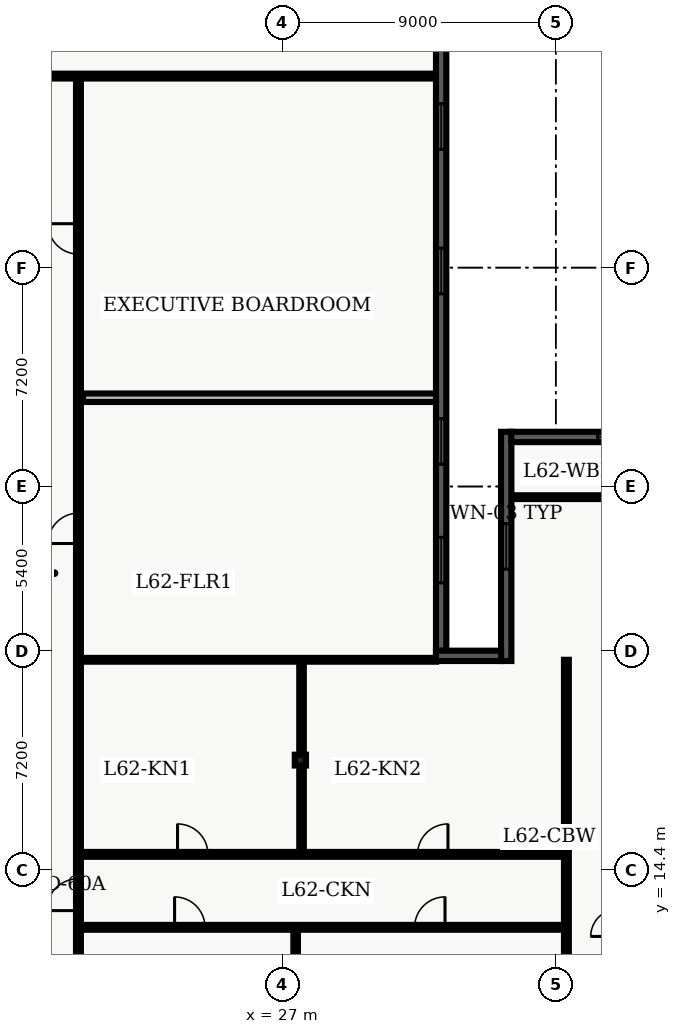
"""IFC4 building model, lengths in metres.
Left out: names, types, materials, properties, quantities, classifications, styles, units other than length and angle.
Written with IfcOpenShell. Run it as: python <this file> out.ifc"""

import sys

from ifc_helpers import new_model, entity, si_unit, converted_unit, direction, frame, origin_with_axes, origin_2d_with_axis, place, context, subcontext, project, spatial, polyline, rectangle, i_section, outline, extrude, element, fill, save


model = new_model("IFC4")
c1 = context("Model", 3, precision=1e-05, world=origin_with_axes(), true_north=direction((0.0, 1.0)))
c2 = subcontext(c1, "Body", "Model", "MODEL_VIEW")
j1 = project(units=[si_unit("LENGTHUNIT", "METRE"), converted_unit("PLANEANGLEUNIT", "DEGREE", entity("IfcPlaneAngleMeasure", 0.017), si_unit("PLANEANGLEUNIT", "RADIAN"), dimensions=[0, 0, 0, 0, 0, 0, 0])], contexts=[c1])
p1 = place(None, origin_with_axes())
s1 = spatial("IfcSite", under=j1, at=p1, CompositionType="ELEMENT")
p2 = place(p1, origin_with_axes())
s2 = spatial("IfcBuilding", under=s1, at=p2, CompositionType="ELEMENT")
p3 = place(p2, frame((0.0, 0.0, 252.9), z_axis=(0.0, 0.0, 1.0), x_axis=(1.0, 0.0, 0.0)))
s3 = spatial("IfcBuildingStorey", under=s2, at=p3, CompositionType="ELEMENT", Elevation=252.9)
p4 = place(p3, frame((27.6, 18.0, 0.0), z_axis=(0.0, 0.0, 1.0), x_axis=(1.0, 0.0, 0.0)))
e1 = element("IfcColumn", 1, at=p4, inside=s3, PredefinedType="COLUMN", context=c2, shape_type="SweptSolid", body=[
    extrude(i_section(OverallWidth=0.369, OverallDepth=0.356, WebThickness=0.011, FlangeThickness=0.018, FilletRadius=0.018, at=origin_2d_with_axis()), origin_with_axes(), (0.0, 0.0, 1.0), 3.9),
])
p5 = place(p3, frame((8.135, 40.5, 0.0), z_axis=(0.0, 0.0, 1.0), x_axis=(1.0, 0.0, 0.0)))
e2 = element("IfcWall", 2, at=p5, inside=s3, PredefinedType="PARTITIONING", context=c2, shape_type="SweptSolid", body=[
    extrude(outline(polyline([(0.0, -0.08), (23.93, -0.08), (23.93, 0.08), (0.0, 0.08), (0.0, -0.08)])), origin_with_axes(), (0.0, 0.0, 1.0), 2.7),
])
p6 = place(p5, frame((0.76, 0.0, 0.0), z_axis=(0.0, 0.0, 1.0), x_axis=(1.0, 0.0, 0.0)))
e3 = element("IfcOpeningElement", 3, at=p6, cuts=e2, PredefinedType="OPENING", context=c2, shape_type="SweptSolid", body=[
    extrude(rectangle(XDim=1.0, YDim=0.18, at=origin_2d_with_axis()), origin_with_axes(), (0.0, 0.0, 1.0), 2.15),
])
p7 = place(p5, frame((7.625, 0.0, 0.0), z_axis=(0.0, 0.0, 1.0), x_axis=(1.0, 0.0, 0.0)))
e4 = element("IfcOpeningElement", 4, at=p7, cuts=e2, PredefinedType="OPENING", context=c2, shape_type="SweptSolid", body=[
    extrude(rectangle(XDim=1.0, YDim=0.18, at=origin_2d_with_axis()), origin_with_axes(), (0.0, 0.0, 1.0), 2.15),
])
p8 = place(p3, frame((20.3, 7.8, 0.0), z_axis=(0.0, 0.0, 1.0), x_axis=(0.0, 1.0, 0.0)))
e5 = element("IfcWall", 5, at=p8, inside=s3, PredefinedType="PARTITIONING", context=c2, shape_type="SweptSolid", body=[
    extrude(outline(polyline([(0.0, -0.08), (32.7, -0.08), (32.7, 0.08), (0.0, 0.08), (0.0, -0.08)])), origin_with_axes(), (0.0, 0.0, 1.0), 2.7),
])
p9 = place(p8, frame((17.825, 0.0, 0.0), z_axis=(0.0, 0.0, 1.0), x_axis=(1.0, 0.0, 0.0)))
e6 = element("IfcOpeningElement", 6, at=p9, cuts=e5, PredefinedType="OPENING", context=c2, shape_type="SweptSolid", body=[
    extrude(rectangle(XDim=1.0, YDim=0.18, at=origin_2d_with_axis()), origin_with_axes(), (0.0, 0.0, 1.0), 2.15),
])
p10 = place(p8, frame((27.345, 0.0, 0.0), z_axis=(0.0, 0.0, 1.0), x_axis=(1.0, 0.0, 0.0)))
e7 = element("IfcOpeningElement", 7, at=p10, cuts=e5, PredefinedType="OPENING", context=c2, shape_type="SweptSolid", body=[
    extrude(rectangle(XDim=1.0, YDim=0.18, at=origin_2d_with_axis()), origin_with_axes(), (0.0, 0.0, 1.0), 2.15),
])
p11 = place(p8, frame((5.775, 0.0, 0.0), z_axis=(0.0, 0.0, 1.0), x_axis=(1.0, 0.0, 0.0)))
e8 = element("IfcOpeningElement", 8, at=p11, cuts=e5, PredefinedType="OPENING", context=c2, shape_type="SweptSolid", body=[
    extrude(rectangle(XDim=1.05, YDim=0.18, at=origin_2d_with_axis()), origin_with_axes(), (0.0, 0.0, 1.0), 2.15),
])
p12 = place(p3, frame((20.45, 29.92, 0.0), z_axis=(0.0, 0.0, 1.0), x_axis=(1.0, 0.0, 0.0)))
e9 = element("IfcWall", 9, at=p12, inside=s3, PredefinedType="PARTITIONING", context=c2, shape_type="SweptSolid", body=[
    extrude(outline(polyline([(0.0, -0.14), (11.615, -0.14), (11.615, 0.14), (0.0, 0.14), (0.0, -0.14)])), origin_with_axes(), (0.0, 0.0, 1.0), 2.7),
])
p13 = place(p3, frame((20.3, 12.5, 0.0), z_axis=(0.0, 0.0, 1.0), x_axis=(1.0, 0.0, 0.0)))
e10 = element("IfcWall", 10, at=p13, inside=s3, PredefinedType="PARTITIONING", context=c2, shape_type="SweptSolid", body=[
    extrude(outline(polyline([(0.0, -0.08), (16.05, -0.08), (16.05, 0.08), (0.0, 0.08), (0.0, -0.08)])), origin_with_axes(), (0.0, 0.0, 1.0), 2.7),
])
p14 = place(p13, frame((3.662, 0.0, 0.0), z_axis=(0.0, 0.0, 1.0), x_axis=(1.0, 0.0, 0.0)))
e11 = element("IfcOpeningElement", 11, at=p14, cuts=e10, PredefinedType="OPENING", context=c2, shape_type="SweptSolid", body=[
    extrude(rectangle(XDim=1.0, YDim=0.18, at=origin_2d_with_axis()), origin_with_axes(), (0.0, 0.0, 1.0), 2.15),
])
p15 = place(p13, frame((11.557, 0.0, 0.0), z_axis=(0.0, 0.0, 1.0), x_axis=(1.0, 0.0, 0.0)))
e12 = element("IfcOpeningElement", 12, at=p15, cuts=e10, PredefinedType="OPENING", context=c2, shape_type="SweptSolid", body=[
    extrude(rectangle(XDim=1.0, YDim=0.18, at=origin_2d_with_axis()), origin_with_axes(), (0.0, 0.0, 1.0), 2.15),
])
p16 = place(p3, frame((20.3, 14.9, 0.0), z_axis=(0.0, 0.0, 1.0), x_axis=(1.0, 0.0, 0.0)))
e13 = element("IfcWall", 13, at=p16, inside=s3, PredefinedType="PARTITIONING", context=c2, shape_type="SweptSolid", body=[
    extrude(outline(polyline([(0.0, -0.08), (16.05, -0.08), (16.05, 0.08), (0.0, 0.08), (0.0, -0.08)])), origin_with_axes(), (0.0, 0.0, 1.0), 2.7),
])
p17 = place(p16, frame((3.759, 0.0, 0.0), z_axis=(0.0, 0.0, 1.0), x_axis=(1.0, 0.0, 0.0)))
e14 = element("IfcOpeningElement", 14, at=p17, cuts=e13, PredefinedType="OPENING", context=c2, shape_type="SweptSolid", body=[
    extrude(rectangle(XDim=1.0, YDim=0.18, at=origin_2d_with_axis()), origin_with_axes(), (0.0, 0.0, 1.0), 2.15),
])
p18 = place(p16, frame((11.654, 0.0, 0.0), z_axis=(0.0, 0.0, 1.0), x_axis=(1.0, 0.0, 0.0)))
e15 = element("IfcOpeningElement", 15, at=p18, cuts=e13, PredefinedType="OPENING", context=c2, shape_type="SweptSolid", body=[
    extrude(rectangle(XDim=1.0, YDim=0.18, at=origin_2d_with_axis()), origin_with_axes(), (0.0, 0.0, 1.0), 2.15),
])
p19 = place(p3, frame((36.35, 4.35, 0.0), z_axis=(0.0, 0.0, 1.0), x_axis=(0.0, 1.0, 0.0)))
e16 = element("IfcWall", 16, at=p19, inside=s3, PredefinedType="PARTITIONING", context=c2, shape_type="SweptSolid", body=[
    extrude(outline(polyline([(0.0, -0.08), (16.95, -0.08), (16.95, 0.08), (0.0, 0.08), (0.0, -0.08)])), origin_with_axes(), (0.0, 0.0, 1.0), 2.7),
])
p20 = place(p3, frame((27.444, 0.335, 0.0), z_axis=(0.0, 0.0, 1.0), x_axis=(0.0, 1.0, 0.0)))
e17 = element("IfcWall", 17, at=p20, inside=s3, PredefinedType="PARTITIONING", context=c2, shape_type="SweptSolid", body=[
    extrude(outline(polyline([(0.0, -0.075), (12.045, -0.075), (12.045, 0.075), (0.0, 0.075), (0.0, -0.075)])), origin_with_axes(), (0.0, 0.0, 1.0), 2.7),
])
p21 = place(p3, frame((27.638, 15.02, 0.0), z_axis=(0.0, 0.0, 1.0), x_axis=(0.0, 1.0, 0.0)))
e18 = element("IfcWall", 18, at=p21, inside=s3, PredefinedType="PARTITIONING", context=c2, shape_type="SweptSolid", body=[
    extrude(outline(polyline([(0.0, -0.075), (6.2, -0.075), (6.2, 0.075), (0.0, 0.075), (0.0, -0.075)])), origin_with_axes(), (0.0, 0.0, 1.0), 2.7),
])
p22 = place(p3, frame((34.535, 26.65, 0.0), z_axis=(0.0, 0.0, 1.0), x_axis=(1.0, 0.0, 0.0)))
e19 = element("IfcWall", 19, at=p22, inside=s3, PredefinedType="PARTITIONING", context=c2, shape_type="SweptSolid", body=[
    extrude(outline(polyline([(0.0, -0.062), (12.995, -0.062), (12.995, 0.062), (0.0, 0.062), (0.0, -0.062)])), origin_with_axes(), (0.0, 0.0, 1.0), 2.7),
])
p23 = place(p22, frame((8.465, 0.0, 0.0), z_axis=(0.0, 0.0, 1.0), x_axis=(1.0, 0.0, 0.0)))
e20 = element("IfcOpeningElement", 20, at=p23, cuts=e19, PredefinedType="OPENING", context=c2, shape_type="SweptSolid", body=[
    extrude(rectangle(XDim=1.0, YDim=0.145, at=origin_2d_with_axis()), origin_with_axes(), (0.0, 0.0, 1.0), 2.15),
])
p24 = place(p3, frame((20.3, 21.3, 0.0), z_axis=(0.0, 0.0, 1.0), x_axis=(1.0, 0.0, 0.0)))
e21 = element("IfcWall", 21, at=p24, inside=s3, PredefinedType="PARTITIONING", context=c2, shape_type="SweptSolid", body=[
    extrude(outline(polyline([(0.0, -0.062), (11.765, -0.062), (11.765, 0.062), (0.0, 0.062), (0.0, -0.062)])), origin_with_axes(), (0.0, 0.0, 1.0), 2.7),
])
p25 = place(p3, frame((34.37, 21.26, 0.0), z_axis=(0.0, 0.0, 1.0), x_axis=(0.0, 1.0, 0.0)))
e22 = element("IfcWall", 22, at=p25, inside=s3, PredefinedType="SOLIDWALL", context=c2, shape_type="SweptSolid", body=[
    extrude(outline(polyline([(0.0, -0.17), (7.54, -0.17), (7.54, 0.17), (0.0, 0.17), (0.0, -0.17)])), origin_with_axes(), (0.0, 0.0, 1.0), 3.66),
])
p26 = place(p25, frame((3.77, 0.0, 0.45), z_axis=(0.0, 0.0, 1.0), x_axis=(1.0, 0.0, 0.0)))
e23 = element("IfcOpeningElement", 23, at=p26, cuts=e22, PredefinedType="OPENING", context=c2, shape_type="SweptSolid", body=[
    extrude(rectangle(XDim=1.5, YDim=0.36, at=origin_2d_with_axis()), origin_with_axes(), (0.0, 0.0, 1.0), 2.1),
])
p27 = place(p3, frame((34.54, 28.63, 0.0), z_axis=(0.0, 0.0, 1.0), x_axis=(1.0, 0.0, 0.0)))
e24 = element("IfcWall", 24, at=p27, inside=s3, PredefinedType="SOLIDWALL", context=c2, shape_type="SweptSolid", body=[
    extrude(outline(polyline([(0.0, -0.17), (13.16, -0.17), (13.16, 0.17), (0.0, 0.17), (0.0, -0.17)])), origin_with_axes(), (0.0, 0.0, 1.0), 3.66),
])
p28 = place(p27, frame((3.59, 0.0, 0.45), z_axis=(0.0, 0.0, 1.0), x_axis=(1.0, 0.0, 0.0)))
e25 = element("IfcOpeningElement", 25, at=p28, cuts=e24, PredefinedType="OPENING", context=c2, shape_type="SweptSolid", body=[
    extrude(rectangle(XDim=1.5, YDim=0.36, at=origin_2d_with_axis()), origin_with_axes(), (0.0, 0.0, 1.0), 2.1),
])
p29 = place(p27, frame((9.57, 0.0, 0.45), z_axis=(0.0, 0.0, 1.0), x_axis=(1.0, 0.0, 0.0)))
e26 = element("IfcOpeningElement", 26, at=p29, cuts=e24, PredefinedType="OPENING", context=c2, shape_type="SweptSolid", body=[
    extrude(rectangle(XDim=1.5, YDim=0.36, at=origin_2d_with_axis()), origin_with_axes(), (0.0, 0.0, 1.0), 2.1),
])
p30 = place(p3, frame((32.23, 41.82, 0.0), z_axis=(0.0, 0.0, 1.0), x_axis=(0.0, -1.0, 0.0)))
e27 = element("IfcWall", 27, at=p30, inside=s3, PredefinedType="SOLIDWALL", context=c2, shape_type="SweptSolid", body=[
    extrude(outline(polyline([(0.0, -0.17), (20.22, -0.17), (20.22, 0.17), (0.0, 0.17), (0.0, -0.17)])), origin_with_axes(), (0.0, 0.0, 1.0), 3.66),
])
p31 = place(p30, frame((2.978, 0.0, 0.45), z_axis=(0.0, 0.0, 1.0), x_axis=(1.0, 0.0, 0.0)))
e28 = element("IfcOpeningElement", 28, at=p31, cuts=e27, PredefinedType="OPENING", context=c2, shape_type="SweptSolid", body=[
    extrude(rectangle(XDim=1.5, YDim=0.36, at=origin_2d_with_axis()), origin_with_axes(), (0.0, 0.0, 1.0), 2.1),
])
p32 = place(p30, frame((7.732, 0.0, 0.45), z_axis=(0.0, 0.0, 1.0), x_axis=(1.0, 0.0, 0.0)))
e29 = element("IfcOpeningElement", 29, at=p32, cuts=e27, PredefinedType="OPENING", context=c2, shape_type="SweptSolid", body=[
    extrude(rectangle(XDim=1.5, YDim=0.36, at=origin_2d_with_axis()), origin_with_axes(), (0.0, 0.0, 1.0), 2.1),
])
p33 = place(p30, frame((13.337, 0.0, 0.45), z_axis=(0.0, 0.0, 1.0), x_axis=(1.0, 0.0, 0.0)))
e30 = element("IfcOpeningElement", 30, at=p33, cuts=e27, PredefinedType="OPENING", context=c2, shape_type="SweptSolid", body=[
    extrude(rectangle(XDim=1.5, YDim=0.36, at=origin_2d_with_axis()), origin_with_axes(), (0.0, 0.0, 1.0), 2.1),
])
p34 = place(p30, frame((17.242, 0.0, 0.45), z_axis=(0.0, 0.0, 1.0), x_axis=(1.0, 0.0, 0.0)))
e31 = element("IfcOpeningElement", 31, at=p34, cuts=e27, PredefinedType="OPENING", context=c2, shape_type="SweptSolid", body=[
    extrude(rectangle(XDim=1.5, YDim=0.36, at=origin_2d_with_axis()), origin_with_axes(), (0.0, 0.0, 1.0), 2.1),
])
p35 = place(p3, frame((32.06, 21.43, 0.0), z_axis=(0.0, 0.0, 1.0), x_axis=(1.0, 0.0, 0.0)))
e32 = element("IfcWall", 32, at=p35, inside=s3, PredefinedType="SOLIDWALL", context=c2, shape_type="SweptSolid", body=[
    extrude(outline(polyline([(0.0, -0.17), (2.14, -0.17), (2.14, 0.17), (0.0, 0.17), (0.0, -0.17)])), origin_with_axes(), (0.0, 0.0, 1.0), 3.66),
])
p36 = place(p8, frame((17.825, 0.0, 0.0), z_axis=(0.0, 0.0, 1.0), x_axis=(1.0, 0.0, 0.0)))
e33 = element("IfcDoor", 33, at=p36, inside=s3, OperationType="SINGLE_SWING_LEFT", PredefinedType="DOOR", context=c2, shape_type="SweptSolid", body=[
    extrude(rectangle(XDim=1.0, YDim=0.09, at=origin_2d_with_axis()), origin_with_axes(), (0.0, 0.0, 1.0), 2.15),
])
fill(e6, e33)
p37 = place(p8, frame((27.345, 0.0, 0.0), z_axis=(0.0, 0.0, 1.0), x_axis=(1.0, 0.0, 0.0)))
e34 = element("IfcDoor", 34, at=p37, inside=s3, OperationType="SINGLE_SWING_RIGHT", PredefinedType="DOOR", context=c2, shape_type="SweptSolid", body=[
    extrude(rectangle(XDim=1.0, YDim=0.09, at=origin_2d_with_axis()), origin_with_axes(), (0.0, 0.0, 1.0), 2.15),
])
fill(e7, e34)
p38 = place(p8, frame((5.775, 0.0, 0.0), z_axis=(0.0, 0.0, 1.0), x_axis=(1.0, 0.0, 0.0)))
e35 = element("IfcDoor", 35, at=p38, inside=s3, OperationType="SINGLE_SWING_LEFT", PredefinedType="DOOR", context=c2, shape_type="SweptSolid", body=[
    extrude(rectangle(XDim=1.05, YDim=0.09, at=origin_2d_with_axis()), origin_with_axes(), (0.0, 0.0, 1.0), 2.15),
])
fill(e8, e35)
p39 = place(p13, frame((3.662, 0.0, 0.0), z_axis=(0.0, 0.0, 1.0), x_axis=(1.0, 0.0, 0.0)))
e36 = element("IfcDoor", 36, at=p39, inside=s3, OperationType="SINGLE_SWING_LEFT", PredefinedType="DOOR", context=c2, shape_type="SweptSolid", body=[
    extrude(rectangle(XDim=1.0, YDim=0.09, at=origin_2d_with_axis()), origin_with_axes(), (0.0, 0.0, 1.0), 2.15),
])
fill(e11, e36)
p40 = place(p13, frame((11.557, 0.0, 0.0), z_axis=(0.0, 0.0, 1.0), x_axis=(1.0, 0.0, 0.0)))
e37 = element("IfcDoor", 37, at=p40, inside=s3, OperationType="SINGLE_SWING_RIGHT", PredefinedType="DOOR", context=c2, shape_type="SweptSolid", body=[
    extrude(rectangle(XDim=1.0, YDim=0.09, at=origin_2d_with_axis()), origin_with_axes(), (0.0, 0.0, 1.0), 2.15),
])
fill(e12, e37)
p41 = place(p16, frame((3.759, 0.0, 0.0), z_axis=(0.0, 0.0, 1.0), x_axis=(1.0, 0.0, 0.0)))
e38 = element("IfcDoor", 38, at=p41, inside=s3, OperationType="SINGLE_SWING_LEFT", PredefinedType="DOOR", context=c2, shape_type="SweptSolid", body=[
    extrude(rectangle(XDim=1.0, YDim=0.09, at=origin_2d_with_axis()), origin_with_axes(), (0.0, 0.0, 1.0), 2.15),
])
fill(e14, e38)
p42 = place(p16, frame((11.654, 0.0, 0.0), z_axis=(0.0, 0.0, 1.0), x_axis=(1.0, 0.0, 0.0)))
e39 = element("IfcDoor", 39, at=p42, inside=s3, OperationType="SINGLE_SWING_RIGHT", PredefinedType="DOOR", context=c2, shape_type="SweptSolid", body=[
    extrude(rectangle(XDim=1.0, YDim=0.09, at=origin_2d_with_axis()), origin_with_axes(), (0.0, 0.0, 1.0), 2.15),
])
fill(e15, e39)
p43 = place(p25, frame((3.77, 0.0, 0.45), z_axis=(0.0, 0.0, 1.0), x_axis=(1.0, 0.0, 0.0)))
e40 = element("IfcWindow", 40, at=p43, inside=s3, PredefinedType="WINDOW", context=c2, shape_type="SweptSolid", body=[
    extrude(rectangle(XDim=1.5, YDim=0.09, at=origin_2d_with_axis()), origin_with_axes(), (0.0, 0.0, 1.0), 2.1),
])
fill(e23, e40)
p44 = place(p27, frame((3.59, 0.0, 0.45), z_axis=(0.0, 0.0, 1.0), x_axis=(1.0, 0.0, 0.0)))
e41 = element("IfcWindow", 41, at=p44, inside=s3, PredefinedType="WINDOW", context=c2, shape_type="SweptSolid", body=[
    extrude(rectangle(XDim=1.5, YDim=0.09, at=origin_2d_with_axis()), origin_with_axes(), (0.0, 0.0, 1.0), 2.1),
])
fill(e25, e41)
p45 = place(p30, frame((2.978, 0.0, 0.45), z_axis=(0.0, 0.0, 1.0), x_axis=(1.0, 0.0, 0.0)))
e42 = element("IfcWindow", 42, at=p45, inside=s3, PredefinedType="WINDOW", context=c2, shape_type="SweptSolid", body=[
    extrude(rectangle(XDim=1.5, YDim=0.09, at=origin_2d_with_axis()), origin_with_axes(), (0.0, 0.0, 1.0), 2.1),
])
fill(e28, e42)
p46 = place(p30, frame((7.732, 0.0, 0.45), z_axis=(0.0, 0.0, 1.0), x_axis=(1.0, 0.0, 0.0)))
e43 = element("IfcWindow", 43, at=p46, inside=s3, PredefinedType="WINDOW", context=c2, shape_type="SweptSolid", body=[
    extrude(rectangle(XDim=1.5, YDim=0.09, at=origin_2d_with_axis()), origin_with_axes(), (0.0, 0.0, 1.0), 2.1),
])
fill(e29, e43)
p47 = place(p30, frame((13.337, 0.0, 0.45), z_axis=(0.0, 0.0, 1.0), x_axis=(1.0, 0.0, 0.0)))
e44 = element("IfcWindow", 44, at=p47, inside=s3, PredefinedType="WINDOW", context=c2, shape_type="SweptSolid", body=[
    extrude(rectangle(XDim=1.5, YDim=0.09, at=origin_2d_with_axis()), origin_with_axes(), (0.0, 0.0, 1.0), 2.1),
])
fill(e30, e44)
p48 = place(p30, frame((17.242, 0.0, 0.45), z_axis=(0.0, 0.0, 1.0), x_axis=(1.0, 0.0, 0.0)))
e45 = element("IfcWindow", 45, at=p48, inside=s3, PredefinedType="WINDOW", context=c2, shape_type="SweptSolid", body=[
    extrude(rectangle(XDim=1.5, YDim=0.09, at=origin_2d_with_axis()), origin_with_axes(), (0.0, 0.0, 1.0), 2.1),
])
fill(e31, e45)
save(model, sys.argv[1])
